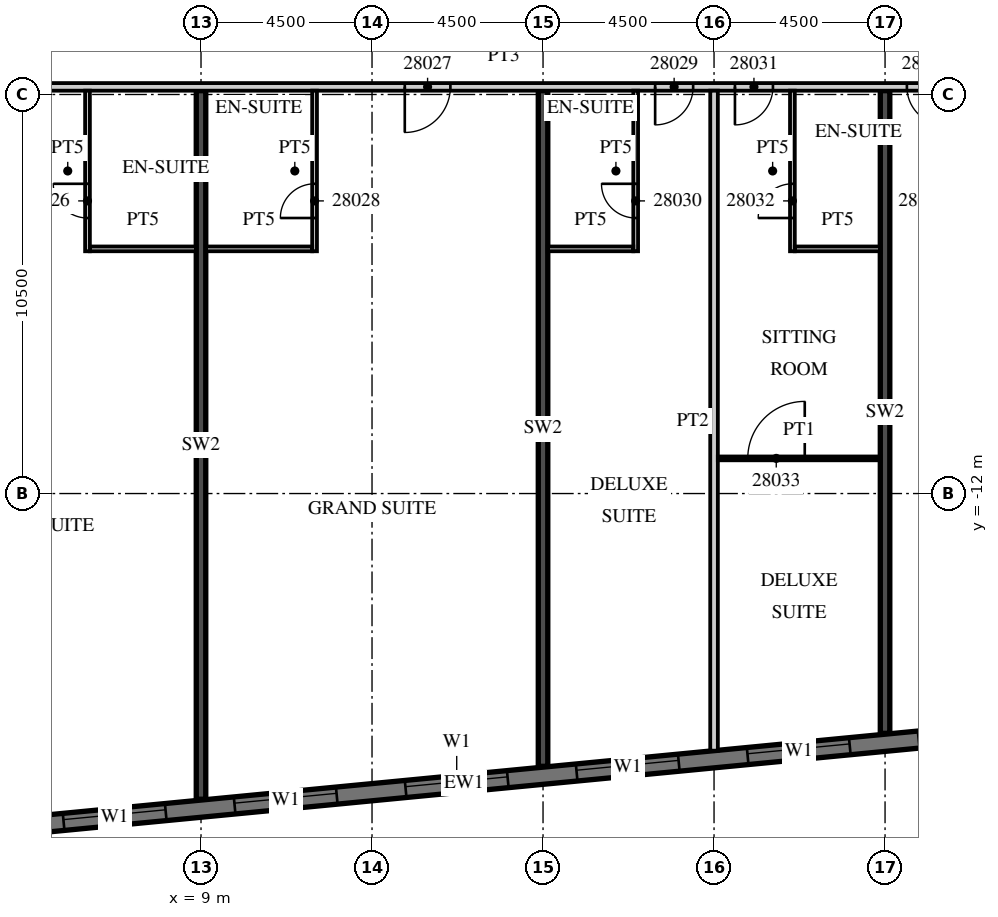
"""IFC4 building model, lengths in metres.
Left out: names, types, materials, properties, quantities, classifications, styles, units other than length and angle.
Written with IfcOpenShell. Run it as: python <this file> out.ifc"""

import sys

from ifc_helpers import new_model, si_unit, direction, frame, frame_2d, origin, place, context, subcontext, project, spatial, rectangle, extrude, element, fill, save


model = new_model("IFC4")
c1 = context("Model", 3, precision=1e-05, world=origin(), true_north=direction((0.0, 1.0)))
c2 = subcontext(c1, "Body", "Model", "MODEL_VIEW")
j1 = project(units=[si_unit("LENGTHUNIT", "METRE"), si_unit("PLANEANGLEUNIT", "RADIAN")], contexts=[c1])
p1 = place(None, origin())
s1 = spatial("IfcSite", under=j1, at=p1, CompositionType="ELEMENT")
p2 = place(p1, origin())
s2 = spatial("IfcBuilding", under=s1, at=p2, CompositionType="ELEMENT")
p3 = place(p2, frame((0.0, 0.0, 127.3)))
s3 = spatial("IfcBuildingStorey", under=s2, at=p3, CompositionType="ELEMENT", Elevation=127.3)
p4 = place(p3, frame((9.0, -20.044, 0.0), z_axis=(0.0, 0.0, 1.0), x_axis=(0.0, 1.0, 0.0)))
e1 = element("IfcWall", 1, at=p4, inside=s3, PredefinedType="SHEAR", context=c2, shape_type="SweptSolid", body=[
    extrude(rectangle(XDim=18.644, YDim=0.25, at=frame_2d((9.322, 0.0))), origin(), (0.0, 0.0, 1.0), 3.3),
])
p5 = place(p3, frame((18.0, -19.177, 0.0), z_axis=(0.0, 0.0, 1.0), x_axis=(0.0, 1.0, 0.0)))
e2 = element("IfcWall", 2, at=p5, inside=s3, PredefinedType="SHEAR", context=c2, shape_type="SweptSolid", body=[
    extrude(rectangle(XDim=17.777, YDim=0.25, at=frame_2d((8.889, 0.0))), origin(), (0.0, 0.0, 1.0), 3.3),
])
p6 = place(p3, frame((27.0, -18.311, 0.0), z_axis=(0.0, 0.0, 1.0), x_axis=(0.0, 1.0, 0.0)))
e3 = element("IfcWall", 3, at=p6, inside=s3, PredefinedType="SHEAR", context=c2, shape_type="SweptSolid", body=[
    extrude(rectangle(XDim=16.911, YDim=0.25, at=frame_2d((8.455, 0.0))), origin(), (0.0, 0.0, 1.0), 3.3),
])
p7 = place(p3, frame((-13.521, -22.46, 0.0), z_axis=(0.0, 0.0, 1.0), x_axis=(0.995396096335, 0.095846812164, 0.0)))
e4 = element("IfcWall", 4, at=p7, inside=s3, PredefinedType="SOLIDWALL", context=c2, shape_type="SweptSolid", body=[
    extrude(rectangle(XDim=59.151, YDim=0.45, at=frame_2d((29.575, 0.0))), origin(), (0.0, 0.0, 1.0), 3.02),
])
p8 = place(p7, frame((0.91, 0.0, 0.45)))
e5 = element("IfcOpeningElement", 5, at=p8, cuts=e4, PredefinedType="OPENING", context=c2, shape_type="SweptSolid", body=[
    extrude(rectangle(XDim=2.7, YDim=2.25, at=frame_2d((1.35, 1.125))), frame((0.0, 0.235, 0.0), z_axis=(0.0, -1.0, 0.0), x_axis=(1.0, 0.0, 0.0)), (0.0, 0.0, 1.0), 0.47),
])
p9 = place(p7, frame((5.431, 0.0, 0.45)))
e6 = element("IfcOpeningElement", 6, at=p9, cuts=e4, PredefinedType="OPENING", context=c2, shape_type="SweptSolid", body=[
    extrude(rectangle(XDim=2.7, YDim=2.25, at=frame_2d((1.35, 1.125))), frame((0.0, 0.235, 0.0), z_axis=(0.0, -1.0, 0.0), x_axis=(1.0, 0.0, 0.0)), (0.0, 0.0, 1.0), 0.47),
])
p10 = place(p7, frame((9.952, 0.0, 0.45)))
e7 = element("IfcOpeningElement", 7, at=p10, cuts=e4, PredefinedType="OPENING", context=c2, shape_type="SweptSolid", body=[
    extrude(rectangle(XDim=2.7, YDim=2.25, at=frame_2d((1.35, 1.125))), frame((0.0, 0.235, 0.0), z_axis=(0.0, -1.0, 0.0), x_axis=(1.0, 0.0, 0.0)), (0.0, 0.0, 1.0), 0.47),
])
p11 = place(p7, frame((14.473, 0.0, 0.45)))
e8 = element("IfcOpeningElement", 8, at=p11, cuts=e4, PredefinedType="OPENING", context=c2, shape_type="SweptSolid", body=[
    extrude(rectangle(XDim=2.7, YDim=2.25, at=frame_2d((1.35, 1.125))), frame((0.0, 0.235, 0.0), z_axis=(0.0, -1.0, 0.0), x_axis=(1.0, 0.0, 0.0)), (0.0, 0.0, 1.0), 0.47),
])
p12 = place(p7, frame((18.994, 0.0, 0.45)))
e9 = element("IfcOpeningElement", 9, at=p12, cuts=e4, PredefinedType="OPENING", context=c2, shape_type="SweptSolid", body=[
    extrude(rectangle(XDim=2.7, YDim=2.25, at=frame_2d((1.35, 1.125))), frame((0.0, 0.235, 0.0), z_axis=(0.0, -1.0, 0.0), x_axis=(1.0, 0.0, 0.0)), (0.0, 0.0, 1.0), 0.47),
])
p13 = place(p7, frame((23.514, 0.0, 0.45)))
e10 = element("IfcOpeningElement", 10, at=p13, cuts=e4, PredefinedType="OPENING", context=c2, shape_type="SweptSolid", body=[
    extrude(rectangle(XDim=2.7, YDim=2.25, at=frame_2d((1.35, 1.125))), frame((0.0, 0.235, 0.0), z_axis=(0.0, -1.0, 0.0), x_axis=(1.0, 0.0, 0.0)), (0.0, 0.0, 1.0), 0.47),
])
p14 = place(p7, frame((28.035, 0.0, 0.45)))
e11 = element("IfcOpeningElement", 11, at=p14, cuts=e4, PredefinedType="OPENING", context=c2, shape_type="SweptSolid", body=[
    extrude(rectangle(XDim=2.7, YDim=2.25, at=frame_2d((1.35, 1.125))), frame((0.0, 0.235, 0.0), z_axis=(0.0, -1.0, 0.0), x_axis=(1.0, 0.0, 0.0)), (0.0, 0.0, 1.0), 0.47),
])
p15 = place(p7, frame((32.556, 0.0, 0.45)))
e12 = element("IfcOpeningElement", 12, at=p15, cuts=e4, PredefinedType="OPENING", context=c2, shape_type="SweptSolid", body=[
    extrude(rectangle(XDim=2.7, YDim=2.25, at=frame_2d((1.35, 1.125))), frame((0.0, 0.235, 0.0), z_axis=(0.0, -1.0, 0.0), x_axis=(1.0, 0.0, 0.0)), (0.0, 0.0, 1.0), 0.47),
])
p16 = place(p7, frame((37.077, 0.0, 0.45)))
e13 = element("IfcOpeningElement", 13, at=p16, cuts=e4, PredefinedType="OPENING", context=c2, shape_type="SweptSolid", body=[
    extrude(rectangle(XDim=2.7, YDim=2.25, at=frame_2d((1.35, 1.125))), frame((0.0, 0.235, 0.0), z_axis=(0.0, -1.0, 0.0), x_axis=(1.0, 0.0, 0.0)), (0.0, 0.0, 1.0), 0.47),
])
p17 = place(p7, frame((41.598, 0.0, 0.45)))
e14 = element("IfcOpeningElement", 14, at=p17, cuts=e4, PredefinedType="OPENING", context=c2, shape_type="SweptSolid", body=[
    extrude(rectangle(XDim=2.7, YDim=2.25, at=frame_2d((1.35, 1.125))), frame((0.0, 0.235, 0.0), z_axis=(0.0, -1.0, 0.0), x_axis=(1.0, 0.0, 0.0)), (0.0, 0.0, 1.0), 0.47),
])
p18 = place(p7, frame((46.118, 0.0, 0.45)))
e15 = element("IfcOpeningElement", 15, at=p18, cuts=e4, PredefinedType="OPENING", context=c2, shape_type="SweptSolid", body=[
    extrude(rectangle(XDim=2.7, YDim=2.25, at=frame_2d((1.35, 1.125))), frame((0.0, 0.235, 0.0), z_axis=(0.0, -1.0, 0.0), x_axis=(1.0, 0.0, 0.0)), (0.0, 0.0, 1.0), 0.47),
])
p19 = place(p7, frame((50.639, 0.0, 0.45)))
e16 = element("IfcOpeningElement", 16, at=p19, cuts=e4, PredefinedType="OPENING", context=c2, shape_type="SweptSolid", body=[
    extrude(rectangle(XDim=2.7, YDim=2.25, at=frame_2d((1.35, 1.125))), frame((0.0, 0.235, 0.0), z_axis=(0.0, -1.0, 0.0), x_axis=(1.0, 0.0, 0.0)), (0.0, 0.0, 1.0), 0.47),
])
p20 = place(p7, frame((55.15, 0.0, 0.45)))
e17 = element("IfcOpeningElement", 17, at=p20, cuts=e4, PredefinedType="OPENING", context=c2, shape_type="SweptSolid", body=[
    extrude(rectangle(XDim=2.7, YDim=2.25, at=frame_2d((1.35, 1.125))), frame((0.0, 0.235, 0.0), z_axis=(0.0, -1.0, 0.0), x_axis=(1.0, 0.0, 0.0)), (0.0, 0.0, 1.0), 0.47),
])
p21 = place(p3, frame((-13.5, -1.3, 0.0), z_axis=(0.0, 0.0, 1.0), x_axis=(1.0, 0.0, 0.0)))
e18 = element("IfcWall", 18, at=p21, inside=s3, PredefinedType="PARTITIONING", context=c2, shape_type="SweptSolid", body=[
    extrude(rectangle(XDim=60.932, YDim=0.2, at=frame_2d((30.466, 0.0))), origin(), (0.0, 0.0, 1.0), 3.02),
])
p22 = place(p21, frame((2.925, 0.0, 0.0)))
e19 = element("IfcOpeningElement", 19, at=p22, cuts=e18, PredefinedType="OPENING", context=c2, shape_type="SweptSolid", body=[
    extrude(rectangle(XDim=1.0, YDim=2.1, at=frame_2d((0.5, 1.05))), frame((0.0, 0.11, 0.0), z_axis=(0.0, -1.0, 0.0), x_axis=(1.0, 0.0, 0.0)), (0.0, 0.0, 1.0), 0.22),
])
p23 = place(p21, frame((9.863, 0.0, 0.0)))
e20 = element("IfcOpeningElement", 20, at=p23, cuts=e18, PredefinedType="OPENING", context=c2, shape_type="SweptSolid", body=[
    extrude(rectangle(XDim=1.2, YDim=2.1, at=frame_2d((0.6, 1.05))), frame((0.0, 0.11, 0.0), z_axis=(0.0, -1.0, 0.0), x_axis=(1.0, 0.0, 0.0)), (0.0, 0.0, 1.0), 0.22),
])
p24 = place(p21, frame((15.938, 0.0, 0.0)))
e21 = element("IfcOpeningElement", 21, at=p24, cuts=e18, PredefinedType="OPENING", context=c2, shape_type="SweptSolid", body=[
    extrude(rectangle(XDim=1.2, YDim=2.1, at=frame_2d((0.6, 1.05))), frame((0.0, 0.11, 0.0), z_axis=(0.0, -1.0, 0.0), x_axis=(1.0, 0.0, 0.0)), (0.0, 0.0, 1.0), 0.22),
])
p25 = place(p21, frame((27.862, 0.0, 0.0)))
e22 = element("IfcOpeningElement", 22, at=p25, cuts=e18, PredefinedType="OPENING", context=c2, shape_type="SweptSolid", body=[
    extrude(rectangle(XDim=1.2, YDim=2.1, at=frame_2d((0.6, 1.05))), frame((0.0, 0.11, 0.0), z_axis=(0.0, -1.0, 0.0), x_axis=(1.0, 0.0, 0.0)), (0.0, 0.0, 1.0), 0.22),
])
p26 = place(p21, frame((34.45, 0.0, 0.0)))
e23 = element("IfcOpeningElement", 23, at=p26, cuts=e18, PredefinedType="OPENING", context=c2, shape_type="SweptSolid", body=[
    extrude(rectangle(XDim=1.0, YDim=2.1, at=frame_2d((0.5, 1.05))), frame((0.0, 0.11, 0.0), z_axis=(0.0, -1.0, 0.0), x_axis=(1.0, 0.0, 0.0)), (0.0, 0.0, 1.0), 0.22),
])
p27 = place(p21, frame((36.55, 0.0, 0.0)))
e24 = element("IfcOpeningElement", 24, at=p27, cuts=e18, PredefinedType="OPENING", context=c2, shape_type="SweptSolid", body=[
    extrude(rectangle(XDim=1.0, YDim=2.1, at=frame_2d((0.5, 1.05))), frame((0.0, 0.11, 0.0), z_axis=(0.0, -1.0, 0.0), x_axis=(1.0, 0.0, 0.0)), (0.0, 0.0, 1.0), 0.22),
])
p28 = place(p21, frame((41.075, 0.0, 0.0)))
e25 = element("IfcOpeningElement", 25, at=p28, cuts=e18, PredefinedType="OPENING", context=c2, shape_type="SweptSolid", body=[
    extrude(rectangle(XDim=1.0, YDim=2.1, at=frame_2d((0.5, 1.05))), frame((0.0, 0.11, 0.0), z_axis=(0.0, -1.0, 0.0), x_axis=(1.0, 0.0, 0.0)), (0.0, 0.0, 1.0), 0.22),
])
p29 = place(p21, frame((45.55, 0.0, 0.0)))
e26 = element("IfcOpeningElement", 26, at=p29, cuts=e18, PredefinedType="OPENING", context=c2, shape_type="SweptSolid", body=[
    extrude(rectangle(XDim=1.0, YDim=2.1, at=frame_2d((0.5, 1.05))), frame((0.0, 0.11, 0.0), z_axis=(0.0, -1.0, 0.0), x_axis=(1.0, 0.0, 0.0)), (0.0, 0.0, 1.0), 0.22),
])
p30 = place(p21, frame((50.075, 0.0, 0.0)))
e27 = element("IfcOpeningElement", 27, at=p30, cuts=e18, PredefinedType="OPENING", context=c2, shape_type="SweptSolid", body=[
    extrude(rectangle(XDim=1.0, YDim=2.1, at=frame_2d((0.5, 1.05))), frame((0.0, 0.11, 0.0), z_axis=(0.0, -1.0, 0.0), x_axis=(1.0, 0.0, 0.0)), (0.0, 0.0, 1.0), 0.22),
])
p31 = place(p21, frame((54.575, 0.0, 0.0)))
e28 = element("IfcOpeningElement", 28, at=p31, cuts=e18, PredefinedType="OPENING", context=c2, shape_type="SweptSolid", body=[
    extrude(rectangle(XDim=1.0, YDim=2.1, at=frame_2d((0.5, 1.05))), frame((0.0, 0.11, 0.0), z_axis=(0.0, -1.0, 0.0), x_axis=(1.0, 0.0, 0.0)), (0.0, 0.0, 1.0), 0.22),
])
p32 = place(p21, frame((59.882, 0.0, 0.0)))
e29 = element("IfcOpeningElement", 29, at=p32, cuts=e18, PredefinedType="OPENING", context=c2, shape_type="SweptSolid", body=[
    extrude(rectangle(XDim=0.9, YDim=2.1, at=frame_2d((0.45, 1.05))), frame((0.0, 0.11, 0.0), z_axis=(0.0, -1.0, 0.0), x_axis=(1.0, 0.0, 0.0)), (0.0, 0.0, 1.0), 0.22),
])
p33 = place(p3, frame((6.013, -5.625, 0.0), z_axis=(0.0, 0.0, 1.0), x_axis=(0.0, 1.0, 0.0)))
e30 = element("IfcWall", 30, at=p33, inside=s3, PredefinedType="PARTITIONING", context=c2, shape_type="SweptSolid", body=[
    extrude(rectangle(XDim=4.225, YDim=0.125, at=frame_2d((2.113, 0.0))), origin(), (0.0, 0.0, 1.0), 3.02),
])
p34 = place(p33, frame((0.875, 0.0, 0.0)))
e31 = element("IfcOpeningElement", 31, at=p34, cuts=e30, PredefinedType="OPENING", context=c2, shape_type="SweptSolid", body=[
    extrude(rectangle(XDim=0.9, YDim=2.1, at=frame_2d((0.45, 1.05))), frame((0.0, 0.073, 0.0), z_axis=(0.0, -1.0, 0.0), x_axis=(1.0, 0.0, 0.0)), (0.0, 0.0, 1.0), 0.145),
])
p35 = place(p3, frame((6.075, -5.562, 0.0), z_axis=(0.0, 0.0, 1.0), x_axis=(1.0, 0.0, 0.0)))
e32 = element("IfcWall", 32, at=p35, inside=s3, PredefinedType="PARTITIONING", context=c2, shape_type="SweptSolid", body=[
    extrude(rectangle(XDim=2.8, YDim=0.125, at=frame_2d((1.4, 0.0))), origin(), (0.0, 0.0, 1.0), 3.02),
])
p36 = place(p3, frame((11.988, -5.625, 0.0), z_axis=(0.0, 0.0, 1.0), x_axis=(0.0, 1.0, 0.0)))
e33 = element("IfcWall", 33, at=p36, inside=s3, PredefinedType="PARTITIONING", context=c2, shape_type="SweptSolid", body=[
    extrude(rectangle(XDim=4.225, YDim=0.125, at=frame_2d((2.113, 0.0))), origin(), (0.0, 0.0, 1.0), 3.02),
])
p37 = place(p36, frame((0.875, 0.0, 0.0)))
e34 = element("IfcOpeningElement", 34, at=p37, cuts=e33, PredefinedType="OPENING", context=c2, shape_type="SweptSolid", body=[
    extrude(rectangle(XDim=0.9, YDim=2.1, at=frame_2d((0.45, 1.05))), frame((0.0, 0.073, 0.0), z_axis=(0.0, -1.0, 0.0), x_axis=(1.0, 0.0, 0.0)), (0.0, 0.0, 1.0), 0.145),
])
p38 = place(p3, frame((9.125, -5.562, 0.0), z_axis=(0.0, 0.0, 1.0), x_axis=(1.0, 0.0, 0.0)))
e35 = element("IfcWall", 35, at=p38, inside=s3, PredefinedType="PARTITIONING", context=c2, shape_type="SweptSolid", body=[
    extrude(rectangle(XDim=2.8, YDim=0.125, at=frame_2d((1.4, 0.0))), origin(), (0.0, 0.0, 1.0), 3.02),
])
p39 = place(p3, frame((22.5, -18.766, 0.0), z_axis=(0.0, 0.0, 1.0), x_axis=(0.0, 1.0, 0.0)))
e36 = element("IfcWall", 36, at=p39, inside=s3, PredefinedType="PARTITIONING", context=c2, shape_type="SweptSolid", body=[
    extrude(rectangle(XDim=17.366, YDim=0.2, at=frame_2d((8.683, 0.0))), origin(), (0.0, 0.0, 1.0), 3.02),
])
p40 = place(p3, frame((20.438, -5.625, 0.0), z_axis=(0.0, 0.0, 1.0), x_axis=(0.0, 1.0, 0.0)))
e37 = element("IfcWall", 37, at=p40, inside=s3, PredefinedType="PARTITIONING", context=c2, shape_type="SweptSolid", body=[
    extrude(rectangle(XDim=4.225, YDim=0.125, at=frame_2d((2.113, 0.0))), origin(), (0.0, 0.0, 1.0), 3.02),
])
p41 = place(p40, frame((0.875, 0.0, 0.0)))
e38 = element("IfcOpeningElement", 38, at=p41, cuts=e37, PredefinedType="OPENING", context=c2, shape_type="SweptSolid", body=[
    extrude(rectangle(XDim=0.9, YDim=2.1, at=frame_2d((0.45, 1.05))), frame((0.0, 0.073, 0.0), z_axis=(0.0, -1.0, 0.0), x_axis=(1.0, 0.0, 0.0)), (0.0, 0.0, 1.0), 0.145),
])
p42 = place(p3, frame((18.125, -5.562, 0.0), z_axis=(0.0, 0.0, 1.0), x_axis=(1.0, 0.0, 0.0)))
e39 = element("IfcWall", 39, at=p42, inside=s3, PredefinedType="PARTITIONING", context=c2, shape_type="SweptSolid", body=[
    extrude(rectangle(XDim=2.25, YDim=0.125, at=frame_2d((1.125, 0.0))), origin(), (0.0, 0.0, 1.0), 3.02),
])
p43 = place(p3, frame((24.562, -5.625, 0.0), z_axis=(0.0, 0.0, 1.0), x_axis=(0.0, 1.0, 0.0)))
e40 = element("IfcWall", 40, at=p43, inside=s3, PredefinedType="PARTITIONING", context=c2, shape_type="SweptSolid", body=[
    extrude(rectangle(XDim=4.225, YDim=0.125, at=frame_2d((2.113, 0.0))), origin(), (0.0, 0.0, 1.0), 3.02),
])
p44 = place(p43, frame((0.875, 0.0, 0.0)))
e41 = element("IfcOpeningElement", 41, at=p44, cuts=e40, PredefinedType="OPENING", context=c2, shape_type="SweptSolid", body=[
    extrude(rectangle(XDim=0.9, YDim=2.1, at=frame_2d((0.45, 1.05))), frame((0.0, 0.073, 0.0), z_axis=(0.0, -1.0, 0.0), x_axis=(1.0, 0.0, 0.0)), (0.0, 0.0, 1.0), 0.145),
])
p45 = place(p3, frame((24.625, -5.562, 0.0), z_axis=(0.0, 0.0, 1.0), x_axis=(1.0, 0.0, 0.0)))
e42 = element("IfcWall", 42, at=p45, inside=s3, PredefinedType="PARTITIONING", context=c2, shape_type="SweptSolid", body=[
    extrude(rectangle(XDim=2.25, YDim=0.125, at=frame_2d((1.125, 0.0))), origin(), (0.0, 0.0, 1.0), 3.02),
])
p46 = place(p3, frame((22.6, -11.075, 0.0), z_axis=(0.0, 0.0, 1.0), x_axis=(1.0, 0.0, 0.0)))
e43 = element("IfcWall", 43, at=p46, inside=s3, PredefinedType="PARTITIONING", context=c2, shape_type="SweptSolid", body=[
    extrude(rectangle(XDim=4.275, YDim=0.1, at=frame_2d((2.137, 0.0))), origin(), (0.0, 0.0, 1.0), 3.02),
])
p47 = place(p46, frame((0.787, 0.0, 0.0)))
e44 = element("IfcOpeningElement", 44, at=p47, cuts=e43, PredefinedType="OPENING", context=c2, shape_type="SweptSolid", body=[
    extrude(rectangle(XDim=1.5, YDim=2.1, at=frame_2d((0.75, 1.05))), frame((0.0, 0.06, 0.0), z_axis=(0.0, -1.0, 0.0), x_axis=(1.0, 0.0, 0.0)), (0.0, 0.0, 1.0), 0.12),
])
p48 = place(p12, origin())
e45 = element("IfcWindow", 45, at=p48, inside=s3, PartitioningType="SINGLE_PANEL", PredefinedType="WINDOW", context=c2, shape_type="SweptSolid", body=[
    extrude(rectangle(XDim=2.7, YDim=2.25, at=frame_2d((1.35, 1.125))), frame((0.0, 0.09, 0.0), z_axis=(0.0, -1.0, 0.0), x_axis=(1.0, 0.0, 0.0)), (0.0, 0.0, 1.0), 0.06),
])
fill(e9, e45)
p49 = place(p13, origin())
e46 = element("IfcWindow", 46, at=p49, inside=s3, PartitioningType="SINGLE_PANEL", PredefinedType="WINDOW", context=c2, shape_type="SweptSolid", body=[
    extrude(rectangle(XDim=2.7, YDim=2.25, at=frame_2d((1.35, 1.125))), frame((0.0, 0.09, 0.0), z_axis=(0.0, -1.0, 0.0), x_axis=(1.0, 0.0, 0.0)), (0.0, 0.0, 1.0), 0.06),
])
fill(e10, e46)
p50 = place(p14, origin())
e47 = element("IfcWindow", 47, at=p50, inside=s3, PartitioningType="SINGLE_PANEL", PredefinedType="WINDOW", context=c2, shape_type="SweptSolid", body=[
    extrude(rectangle(XDim=2.7, YDim=2.25, at=frame_2d((1.35, 1.125))), frame((0.0, 0.09, 0.0), z_axis=(0.0, -1.0, 0.0), x_axis=(1.0, 0.0, 0.0)), (0.0, 0.0, 1.0), 0.06),
])
fill(e11, e47)
p51 = place(p15, origin())
e48 = element("IfcWindow", 48, at=p51, inside=s3, PartitioningType="SINGLE_PANEL", PredefinedType="WINDOW", context=c2, shape_type="SweptSolid", body=[
    extrude(rectangle(XDim=2.7, YDim=2.25, at=frame_2d((1.35, 1.125))), frame((0.0, 0.09, 0.0), z_axis=(0.0, -1.0, 0.0), x_axis=(1.0, 0.0, 0.0)), (0.0, 0.0, 1.0), 0.06),
])
fill(e12, e48)
p52 = place(p16, origin())
e49 = element("IfcWindow", 49, at=p52, inside=s3, PartitioningType="SINGLE_PANEL", PredefinedType="WINDOW", context=c2, shape_type="SweptSolid", body=[
    extrude(rectangle(XDim=2.7, YDim=2.25, at=frame_2d((1.35, 1.125))), frame((0.0, 0.09, 0.0), z_axis=(0.0, -1.0, 0.0), x_axis=(1.0, 0.0, 0.0)), (0.0, 0.0, 1.0), 0.06),
])
fill(e13, e49)
p53 = place(p34, origin())
e50 = element("IfcDoor", 50, at=p53, inside=s3, OperationType="SINGLE_SWING_RIGHT", PredefinedType="DOOR", context=c2, shape_type="SweptSolid", body=[
    extrude(rectangle(XDim=0.9, YDim=2.1, at=frame_2d((0.45, 1.05))), frame((0.0, 0.025, 0.0), z_axis=(0.0, -1.0, 0.0), x_axis=(1.0, 0.0, 0.0)), (0.0, 0.0, 1.0), 0.05),
])
fill(e31, e50)
p54 = place(p25, origin())
e51 = element("IfcDoor", 51, at=p54, inside=s3, OperationType="SINGLE_SWING_LEFT", PredefinedType="DOOR", context=c2, shape_type="SweptSolid", body=[
    extrude(rectangle(XDim=1.2, YDim=2.1, at=frame_2d((0.6, 1.05))), frame((0.0, 0.025, 0.0), z_axis=(0.0, -1.0, 0.0), x_axis=(1.0, 0.0, 0.0)), (0.0, 0.0, 1.0), 0.05),
])
fill(e22, e51)
p55 = place(p37, origin())
e52 = element("IfcDoor", 52, at=p55, inside=s3, OperationType="SINGLE_SWING_LEFT", PredefinedType="DOOR", context=c2, shape_type="SweptSolid", body=[
    extrude(rectangle(XDim=0.9, YDim=2.1, at=frame_2d((0.45, 1.05))), frame((0.0, 0.025, 0.0), z_axis=(0.0, -1.0, 0.0), x_axis=(1.0, 0.0, 0.0)), (0.0, 0.0, 1.0), 0.05),
])
fill(e34, e52)
p56 = place(p26, origin())
e53 = element("IfcDoor", 53, at=p56, inside=s3, OperationType="SINGLE_SWING_LEFT", PredefinedType="DOOR", context=c2, shape_type="SweptSolid", body=[
    extrude(rectangle(XDim=1.0, YDim=2.1, at=frame_2d((0.5, 1.05))), frame((0.0, 0.025, 0.0), z_axis=(0.0, -1.0, 0.0), x_axis=(1.0, 0.0, 0.0)), (0.0, 0.0, 1.0), 0.05),
])
fill(e23, e53)
p57 = place(p41, origin())
e54 = element("IfcDoor", 54, at=p57, inside=s3, OperationType="SINGLE_SWING_RIGHT", PredefinedType="DOOR", context=c2, shape_type="SweptSolid", body=[
    extrude(rectangle(XDim=0.9, YDim=2.1, at=frame_2d((0.45, 1.05))), frame((0.0, 0.025, 0.0), z_axis=(0.0, -1.0, 0.0), x_axis=(1.0, 0.0, 0.0)), (0.0, 0.0, 1.0), 0.05),
])
fill(e38, e54)
p58 = place(p27, origin())
e55 = element("IfcDoor", 55, at=p58, inside=s3, OperationType="SINGLE_SWING_LEFT", PredefinedType="DOOR", context=c2, shape_type="SweptSolid", body=[
    extrude(rectangle(XDim=1.0, YDim=2.1, at=frame_2d((0.5, 1.05))), frame((0.0, 0.025, 0.0), z_axis=(0.0, -1.0, 0.0), x_axis=(1.0, 0.0, 0.0)), (0.0, 0.0, 1.0), 0.05),
])
fill(e24, e55)
p59 = place(p44, origin())
e56 = element("IfcDoor", 56, at=p59, inside=s3, OperationType="SINGLE_SWING_LEFT", PredefinedType="DOOR", context=c2, shape_type="SweptSolid", body=[
    extrude(rectangle(XDim=0.9, YDim=2.1, at=frame_2d((0.45, 1.05))), frame((0.0, 0.025, 0.0), z_axis=(0.0, -1.0, 0.0), x_axis=(1.0, 0.0, 0.0)), (0.0, 0.0, 1.0), 0.05),
])
fill(e41, e56)
p60 = place(p47, origin())
e57 = element("IfcDoor", 57, at=p60, inside=s3, OperationType="SINGLE_SWING_RIGHT", PredefinedType="DOOR", context=c2, shape_type="SweptSolid", body=[
    extrude(rectangle(XDim=1.5, YDim=2.1, at=frame_2d((0.75, 1.05))), frame((0.0, 0.025, 0.0), z_axis=(0.0, -1.0, 0.0), x_axis=(1.0, 0.0, 0.0)), (0.0, 0.0, 1.0), 0.05),
])
fill(e44, e57)
p61 = place(p28, origin())
e58 = element("IfcDoor", 58, at=p61, inside=s3, OperationType="SINGLE_SWING_RIGHT", PredefinedType="DOOR", context=c2, shape_type="SweptSolid", body=[
    extrude(rectangle(XDim=1.0, YDim=2.1, at=frame_2d((0.5, 1.05))), frame((0.0, 0.025, 0.0), z_axis=(0.0, -1.0, 0.0), x_axis=(1.0, 0.0, 0.0)), (0.0, 0.0, 1.0), 0.05),
])
fill(e25, e58)
save(model, sys.argv[1])
